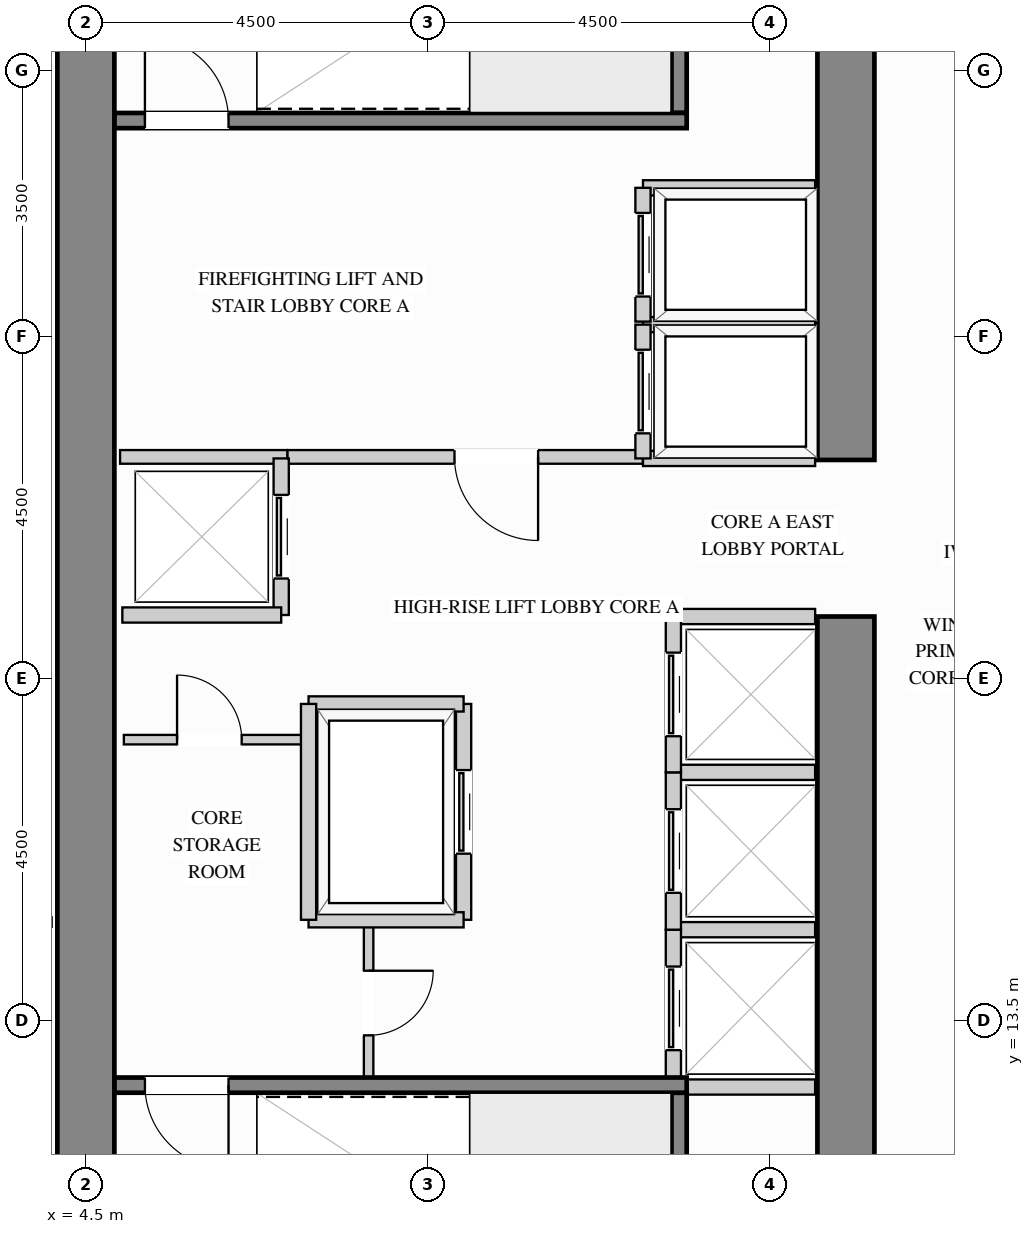
"""IFC4 building model, lengths in metres.
Left out: names, types, materials, properties, quantities, classifications, styles, units other than length and angle.
Written with IfcOpenShell. Run it as: python <this file> out.ifc"""

import sys

from ifc_helpers import new_model, si_unit, direction, frame, frame_2d, origin, place, context, subcontext, project, spatial, rectangle, extrude, source, transform, mapped, element, fill, save


model = new_model("IFC4")
c1 = context("Model", 3, precision=1e-05, world=origin(), true_north=direction((0.0, 1.0)))
c2 = subcontext(c1, "Body", "Model", "MODEL_VIEW")
j1 = project(units=[si_unit("LENGTHUNIT", "METRE"), si_unit("PLANEANGLEUNIT", "RADIAN")], contexts=[c1])
p1 = place(None, origin())
s1 = spatial("IfcSite", under=j1, at=p1, CompositionType="ELEMENT")
p2 = place(p1, origin())
s2 = spatial("IfcBuilding", under=s1, at=p2, CompositionType="ELEMENT")
p3 = place(p2, frame((0.0, 0.0, 95.4)))
s3 = spatial("IfcBuildingStorey", under=s2, at=p3, CompositionType="ELEMENT", Elevation=95.4)
m1 = source(origin(), c2, "Body", "SweptSolid", [
    extrude(rectangle(XDim=9.945, YDim=0.75, at=frame_2d((4.973, 0.0))), origin(), (0.0, 0.0, 1.0), 3.38),
])
p4 = place(p3, frame((14.5, 8.875, 0.0), z_axis=(0.0, 0.0, 1.0), x_axis=(0.0, 1.0, 0.0)))
e1 = element("IfcWall", 1, at=p4, inside=s3, PredefinedType="SHEAR", context=c2, shape_type="MappedRepresentation", body=[
    mapped(m1, transform((0.0, 0.0, 0.0), x_axis=(1.0, 0.0, 0.0), y_axis=(0.0, 1.0, 0.0), z_axis=(0.0, 0.0, 1.0))),
])
m2 = source(origin(), c2, "Body", "SweptSolid", [
    extrude(rectangle(XDim=8.245, YDim=0.75, at=frame_2d((4.123, 0.0))), origin(), (0.0, 0.0, 1.0), 3.38),
])
p5 = place(p3, frame((14.5, 20.88, 0.0), z_axis=(0.0, 0.0, 1.0), x_axis=(0.0, 1.0, 0.0)))
e2 = element("IfcWall", 2, at=p5, inside=s3, PredefinedType="SHEAR", context=c2, shape_type="MappedRepresentation", body=[
    mapped(m2, transform((0.0, 0.0, 0.0), x_axis=(1.0, 0.0, 0.0), y_axis=(0.0, 1.0, 0.0), z_axis=(0.0, 0.0, 1.0))),
])
m3 = source(origin(), c2, "Body", "SweptSolid", [
    extrude(rectangle(XDim=20.25, YDim=0.75, at=frame_2d((10.125, 0.0))), origin(), (0.0, 0.0, 1.0), 3.38),
])
p6 = place(p3, frame((4.5, 8.875, 0.0), z_axis=(0.0, 0.0, 1.0), x_axis=(0.0, 1.0, 0.0)))
e3 = element("IfcWall", 3, at=p6, inside=s3, PredefinedType="SHEAR", context=c2, shape_type="MappedRepresentation", body=[
    mapped(m3, transform((0.0, 0.0, 0.0), x_axis=(1.0, 0.0, 0.0), y_axis=(0.0, 1.0, 0.0), z_axis=(0.0, 0.0, 1.0))),
])
p7 = place(p3, frame((7.15, 20.92, 0.0), z_axis=(0.0, 0.0, 1.0), x_axis=(1.0, 0.0, 0.0)))
e4 = element("IfcWall", 4, at=p7, inside=s3, PredefinedType="PARTITIONING", context=c2, shape_type="SweptSolid", body=[
    extrude(rectangle(XDim=4.68, YDim=0.18, at=frame_2d((2.34, 0.0))), origin(), (0.0, 0.0, 1.0), 3.365),
])
p8 = place(p7, frame((2.2, 0.0, 0.0)))
e5 = element("IfcOpeningElement", 5, at=p8, cuts=e4, PredefinedType="OPENING", context=c2, shape_type="SweptSolid", body=[
    extrude(rectangle(XDim=1.1, YDim=2.15, at=frame_2d((0.55, 1.075))), frame((0.0, 0.1, 0.0), z_axis=(0.0, -1.0, 0.0), x_axis=(1.0, 0.0, 0.0)), (0.0, 0.0, 1.0), 0.2),
])
m4 = source(origin(), c2, "Body", "SweptSolid", [
    extrude(rectangle(XDim=2.2, YDim=0.18, at=frame_2d((1.1, 0.0))), origin(), (0.0, 0.0, 1.0), 3.365),
])
p9 = place(p3, frame((4.95, 20.92, 0.0), z_axis=(0.0, 0.0, 1.0), x_axis=(1.0, 0.0, 0.0)))
e6 = element("IfcWall", 6, at=p9, inside=s3, PredefinedType="PARTITIONING", context=c2, shape_type="MappedRepresentation", body=[
    mapped(m4, transform((0.0, 0.0, 0.0), x_axis=(1.0, 0.0, 0.0), y_axis=(0.0, 1.0, 0.0), z_axis=(0.0, 0.0, 1.0))),
])
p10 = place(p3, frame((8.22, 12.75, 0.0), z_axis=(0.0, 0.0, 1.0), x_axis=(0.0, 1.0, 0.0)))
e7 = element("IfcWall", 7, at=p10, inside=s3, PredefinedType="PARTITIONING", context=c2, shape_type="SweptSolid", body=[
    extrude(rectangle(XDim=2.07, YDim=0.125, at=frame_2d((1.035, 0.0))), origin(), (0.0, 0.0, 1.0), 3.365),
])
p11 = place(p10, frame((0.56, 0.0, 0.0)))
e8 = element("IfcOpeningElement", 8, at=p11, cuts=e7, PredefinedType="OPENING", context=c2, shape_type="SweptSolid", body=[
    extrude(rectangle(XDim=0.85, YDim=2.1, at=frame_2d((0.425, 1.05))), frame((0.0, 0.073, 0.0), z_axis=(0.0, -1.0, 0.0), x_axis=(1.0, 0.0, 0.0)), (0.0, 0.0, 1.0), 0.145),
])
p12 = place(p3, frame((5.0, 17.2, 0.0), z_axis=(0.0, 0.0, 1.0), x_axis=(1.0, 0.0, 0.0)))
e9 = element("IfcWall", 9, at=p12, inside=s3, PredefinedType="PARTITIONING", context=c2, shape_type="SweptSolid", body=[
    extrude(rectangle(XDim=2.4, YDim=0.125, at=frame_2d((1.2, 0.0))), origin(), (0.0, 0.0, 1.0), 3.365),
])
p13 = place(p12, frame((0.7, 0.0, 0.0)))
e10 = element("IfcOpeningElement", 10, at=p13, cuts=e9, PredefinedType="OPENING", context=c2, shape_type="SweptSolid", body=[
    extrude(rectangle(XDim=0.85, YDim=2.1, at=frame_2d((0.425, 1.05))), frame((0.0, 0.073, 0.0), z_axis=(0.0, -1.0, 0.0), x_axis=(1.0, 0.0, 0.0)), (0.0, 0.0, 1.0), 0.145),
])
m5 = source(origin(), c2, "Body", "SweptSolid", [
    extrude(rectangle(XDim=3.698, YDim=0.125, at=frame_2d((1.849, 0.0))), origin(), (0.0, 0.0, 1.0), 3.365),
])
p14 = place(p3, frame((0.352, 14.8, 0.0), z_axis=(0.0, 0.0, 1.0), x_axis=(1.0, 0.0, 0.0)))
e11 = element("IfcWall", 11, at=p14, inside=s3, PredefinedType="PARTITIONING", context=c2, shape_type="MappedRepresentation", body=[
    mapped(m5, transform((0.0, 0.0, 0.0), x_axis=(1.0, 0.0, 0.0), y_axis=(0.0, 1.0, 0.0), z_axis=(0.0, 0.0, 1.0))),
])
m6 = source(origin(), c2, "Body", "SweptSolid", [
    extrude(rectangle(XDim=2.265, YDim=0.2, at=frame_2d((1.132, 0.0))), origin(), (0.0, 0.0, 1.0), 3.365),
])
for number, where, z_axis, x_axis in (
    (12, (11.83, 22.66, 0.0), (0.0, 0.0, 1.0), (1.0, 0.0, 0.0)),
    (13, (11.83, 20.9, 0.0), (0.0, 0.0, 1.0), (1.0, 0.0, 0.0)),
):
    element("IfcWall", number, at=place(p3, frame(where, z_axis=z_axis, x_axis=x_axis)), inside=s3, PredefinedType="PARTITIONING", context=c2, shape_type="MappedRepresentation", body=[
        mapped(m6, transform((0.0, 0.0, 0.0), x_axis=(1.0, 0.0, 0.0), y_axis=(0.0, 1.0, 0.0), z_axis=(0.0, 0.0, 1.0))),
    ])
p15 = place(p3, frame((11.83, 20.9, 0.0), z_axis=(0.0, 0.0, 1.0), x_axis=(0.0, 1.0, 0.0)))
e14 = element("IfcWall", 14, at=p15, inside=s3, PredefinedType="PARTITIONING", context=c2, shape_type="SweptSolid", body=[
    extrude(rectangle(XDim=1.76, YDim=0.2, at=frame_2d((0.88, 0.0))), origin(), (0.0, 0.0, 1.0), 3.365),
])
p16 = place(p15, frame((0.33, 0.0, 0.0)))
e15 = element("IfcOpeningElement", 15, at=p16, cuts=e14, PredefinedType="OPENING", context=c2, shape_type="SweptSolid", body=[
    extrude(rectangle(XDim=1.1, YDim=2.2, at=frame_2d((0.55, 1.1))), frame((0.0, 0.11, 0.0), z_axis=(0.0, -1.0, 0.0), x_axis=(1.0, 0.0, 0.0)), (0.0, 0.0, 1.0), 0.22),
])
p17 = place(p3, frame((11.83, 24.46, 0.0), z_axis=(0.0, 0.0, 1.0), x_axis=(1.0, 0.0, 0.0)))
e16 = element("IfcWall", 16, at=p17, inside=s3, PredefinedType="PARTITIONING", context=c2, shape_type="MappedRepresentation", body=[
    mapped(m6, transform((0.0, 0.0, 0.0), x_axis=(1.0, 0.0, 0.0), y_axis=(0.0, 1.0, 0.0), z_axis=(0.0, 0.0, 1.0))),
])
p18 = place(p3, frame((11.83, 22.7, 0.0), z_axis=(0.0, 0.0, 1.0), x_axis=(0.0, 1.0, 0.0)))
e17 = element("IfcWall", 17, at=p18, inside=s3, PredefinedType="PARTITIONING", context=c2, shape_type="SweptSolid", body=[
    extrude(rectangle(XDim=1.76, YDim=0.2, at=frame_2d((0.88, 0.0))), origin(), (0.0, 0.0, 1.0), 3.365),
])
p19 = place(p18, frame((0.33, 0.0, 0.0)))
e18 = element("IfcOpeningElement", 18, at=p19, cuts=e17, PredefinedType="OPENING", context=c2, shape_type="SweptSolid", body=[
    extrude(rectangle(XDim=1.1, YDim=2.2, at=frame_2d((0.55, 1.1))), frame((0.0, 0.11, 0.0), z_axis=(0.0, -1.0, 0.0), x_axis=(1.0, 0.0, 0.0)), (0.0, 0.0, 1.0), 0.22),
])
m7 = source(origin(), c2, "Body", "SweptSolid", [
    extrude(rectangle(XDim=1.865, YDim=0.2, at=frame_2d((0.933, 0.0))), origin(), (0.0, 0.0, 1.0), 3.365),
])
for number, where, z_axis, x_axis in (
    (19, (12.23, 14.7, 0.0), (0.0, 0.0, 1.0), (1.0, 0.0, 0.0)),
    (20, (12.23, 12.63, 0.0), (0.0, 0.0, 1.0), (1.0, 0.0, 0.0)),
):
    element("IfcWall", number, at=place(p3, frame(where, z_axis=z_axis, x_axis=x_axis)), inside=s3, PredefinedType="PARTITIONING", context=c2, shape_type="MappedRepresentation", body=[
        mapped(m7, transform((0.0, 0.0, 0.0), x_axis=(1.0, 0.0, 0.0), y_axis=(0.0, 1.0, 0.0), z_axis=(0.0, 0.0, 1.0))),
    ])
p20 = place(p3, frame((12.23, 12.63, 0.0), z_axis=(0.0, 0.0, 1.0), x_axis=(0.0, 1.0, 0.0)))
e21 = element("IfcWall", 21, at=p20, inside=s3, PredefinedType="PARTITIONING", context=c2, shape_type="SweptSolid", body=[
    extrude(rectangle(XDim=2.07, YDim=0.2, at=frame_2d((1.035, 0.0))), origin(), (0.0, 0.0, 1.0), 3.365),
])
p21 = place(p20, frame((0.485, 0.0, 0.0)))
e22 = element("IfcOpeningElement", 22, at=p21, cuts=e21, PredefinedType="OPENING", context=c2, shape_type="SweptSolid", body=[
    extrude(rectangle(XDim=1.1, YDim=2.2, at=frame_2d((0.55, 1.1))), frame((0.0, 0.11, 0.0), z_axis=(0.0, -1.0, 0.0), x_axis=(1.0, 0.0, 0.0)), (0.0, 0.0, 1.0), 0.22),
])
p22 = place(p3, frame((12.23, 16.77, 0.0), z_axis=(0.0, 0.0, 1.0), x_axis=(1.0, 0.0, 0.0)))
e23 = element("IfcWall", 23, at=p22, inside=s3, PredefinedType="PARTITIONING", context=c2, shape_type="MappedRepresentation", body=[
    mapped(m7, transform((0.0, 0.0, 0.0), x_axis=(1.0, 0.0, 0.0), y_axis=(0.0, 1.0, 0.0), z_axis=(0.0, 0.0, 1.0))),
])
p23 = place(p3, frame((12.23, 14.7, 0.0), z_axis=(0.0, 0.0, 1.0), x_axis=(0.0, 1.0, 0.0)))
e24 = element("IfcWall", 24, at=p23, inside=s3, PredefinedType="PARTITIONING", context=c2, shape_type="SweptSolid", body=[
    extrude(rectangle(XDim=2.07, YDim=0.2, at=frame_2d((1.035, 0.0))), origin(), (0.0, 0.0, 1.0), 3.365),
])
p24 = place(p23, frame((0.485, 0.0, 0.0)))
e25 = element("IfcOpeningElement", 25, at=p24, cuts=e24, PredefinedType="OPENING", context=c2, shape_type="SweptSolid", body=[
    extrude(rectangle(XDim=1.1, YDim=2.2, at=frame_2d((0.55, 1.1))), frame((0.0, 0.11, 0.0), z_axis=(0.0, -1.0, 0.0), x_axis=(1.0, 0.0, 0.0)), (0.0, 0.0, 1.0), 0.22),
])
p25 = place(p3, frame((12.23, 18.82, 0.0), z_axis=(0.0, 0.0, 1.0), x_axis=(1.0, 0.0, 0.0)))
e26 = element("IfcWall", 26, at=p25, inside=s3, PredefinedType="PARTITIONING", context=c2, shape_type="MappedRepresentation", body=[
    mapped(m7, transform((0.0, 0.0, 0.0), x_axis=(1.0, 0.0, 0.0), y_axis=(0.0, 1.0, 0.0), z_axis=(0.0, 0.0, 1.0))),
])
p26 = place(p3, frame((12.23, 16.77, 0.0), z_axis=(0.0, 0.0, 1.0), x_axis=(0.0, 1.0, 0.0)))
e27 = element("IfcWall", 27, at=p26, inside=s3, PredefinedType="PARTITIONING", context=c2, shape_type="SweptSolid", body=[
    extrude(rectangle(XDim=2.05, YDim=0.2, at=frame_2d((1.025, 0.0))), origin(), (0.0, 0.0, 1.0), 3.365),
])
p27 = place(p26, frame((0.475, 0.0, 0.0)))
e28 = element("IfcOpeningElement", 28, at=p27, cuts=e27, PredefinedType="OPENING", context=c2, shape_type="SweptSolid", body=[
    extrude(rectangle(XDim=1.1, YDim=2.2, at=frame_2d((0.55, 1.1))), frame((0.0, 0.11, 0.0), z_axis=(0.0, -1.0, 0.0), x_axis=(1.0, 0.0, 0.0)), (0.0, 0.0, 1.0), 0.22),
])
p28 = place(p3, frame((7.07, 18.84, 0.0), z_axis=(0.0, 0.0, 1.0), x_axis=(0.0, 1.0, 0.0)))
e29 = element("IfcWall", 29, at=p28, inside=s3, PredefinedType="PARTITIONING", context=c2, shape_type="SweptSolid", body=[
    extrude(rectangle(XDim=2.06, YDim=0.2, at=frame_2d((1.03, 0.0))), origin(), (0.0, 0.0, 1.0), 3.365),
])
p29 = place(p28, frame((0.48, 0.0, 0.0)))
e30 = element("IfcOpeningElement", 30, at=p29, cuts=e29, PredefinedType="OPENING", context=c2, shape_type="SweptSolid", body=[
    extrude(rectangle(XDim=1.1, YDim=2.2, at=frame_2d((0.55, 1.1))), frame((0.0, 0.11, 0.0), z_axis=(0.0, -1.0, 0.0), x_axis=(1.0, 0.0, 0.0)), (0.0, 0.0, 1.0), 0.22),
])
m8 = source(origin(), c2, "Body", "SweptSolid", [
    extrude(rectangle(XDim=2.09, YDim=0.2, at=frame_2d((1.045, 0.0))), origin(), (0.0, 0.0, 1.0), 3.365),
])
p30 = place(p3, frame((4.98, 18.84, 0.0), z_axis=(0.0, 0.0, 1.0), x_axis=(1.0, 0.0, 0.0)))
e31 = element("IfcWall", 31, at=p30, inside=s3, PredefinedType="PARTITIONING", context=c2, shape_type="MappedRepresentation", body=[
    mapped(m8, transform((0.0, 0.0, 0.0), x_axis=(1.0, 0.0, 0.0), y_axis=(0.0, 1.0, 0.0), z_axis=(0.0, 0.0, 1.0))),
])
p31 = place(p3, frame((9.47, 14.83, 0.0), z_axis=(0.0, 0.0, 1.0), x_axis=(0.0, 1.0, 0.0)))
e32 = element("IfcWall", 32, at=p31, inside=s3, PredefinedType="PARTITIONING", context=c2, shape_type="SweptSolid", body=[
    extrude(rectangle(XDim=2.84, YDim=0.2, at=frame_2d((1.42, 0.0))), origin(), (0.0, 0.0, 1.0), 3.365),
])
p32 = place(p31, frame((0.87, 0.0, 0.0)))
e33 = element("IfcOpeningElement", 33, at=p32, cuts=e32, PredefinedType="OPENING", context=c2, shape_type="SweptSolid", body=[
    extrude(rectangle(XDim=1.1, YDim=2.2, at=frame_2d((0.55, 1.1))), frame((0.0, 0.11, 0.0), z_axis=(0.0, -1.0, 0.0), x_axis=(1.0, 0.0, 0.0)), (0.0, 0.0, 1.0), 0.22),
])
m9 = source(origin(), c2, "Body", "SweptSolid", [
    extrude(rectangle(XDim=2.04, YDim=0.2, at=frame_2d((1.02, 0.0))), origin(), (0.0, 0.0, 1.0), 3.365),
])
for number, where, z_axis, x_axis in (
    (34, (7.43, 17.67, 0.0), (0.0, 0.0, 1.0), (1.0, 0.0, 0.0)),
    (35, (7.43, 14.83, 0.0), (0.0, 0.0, 1.0), (1.0, 0.0, 0.0)),
):
    element("IfcWall", number, at=place(p3, frame(where, z_axis=z_axis, x_axis=x_axis)), inside=s3, PredefinedType="PARTITIONING", context=c2, shape_type="MappedRepresentation", body=[
        mapped(m9, transform((0.0, 0.0, 0.0), x_axis=(1.0, 0.0, 0.0), y_axis=(0.0, 1.0, 0.0), z_axis=(0.0, 0.0, 1.0))),
    ])
m10 = source(origin(), c2, "Body", "SweptSolid", [
    extrude(rectangle(XDim=2.84, YDim=0.2, at=frame_2d((1.42, 0.0))), origin(), (0.0, 0.0, 1.0), 3.365),
])
p33 = place(p3, frame((7.43, 14.83, 0.0), z_axis=(0.0, 0.0, 1.0), x_axis=(0.0, 1.0, 0.0)))
e36 = element("IfcWall", 36, at=p33, inside=s3, PredefinedType="PARTITIONING", context=c2, shape_type="MappedRepresentation", body=[
    mapped(m10, transform((0.0, 0.0, 0.0), x_axis=(1.0, 0.0, 0.0), y_axis=(0.0, 1.0, 0.0), z_axis=(0.0, 0.0, 1.0))),
])
m11 = source(origin(), c2, "Body", "SweptSolid", [
    extrude(rectangle(XDim=3.678, YDim=0.2, at=frame_2d((1.839, 0.0))), origin(), (0.0, 0.0, 1.0), 3.38),
])
p34 = place(p3, frame((12.305, 8.877, 0.0), z_axis=(0.0, 0.0, 1.0), x_axis=(0.0, 1.0, 0.0)))
e37 = element("IfcWall", 37, at=p34, inside=s3, PredefinedType="SHEAR", context=c2, shape_type="MappedRepresentation", body=[
    mapped(m11, transform((0.0, 0.0, 0.0), x_axis=(1.0, 0.0, 0.0), y_axis=(0.0, 1.0, 0.0), z_axis=(0.0, 0.0, 1.0))),
])
p35 = place(p3, frame((4.877, 12.655, 0.0), z_axis=(0.0, 0.0, 1.0), x_axis=(1.0, 0.0, 0.0)))
e38 = element("IfcWall", 38, at=p35, inside=s3, PredefinedType="SHEAR", context=c2, shape_type="SweptSolid", body=[
    extrude(rectangle(XDim=7.528, YDim=0.2, at=frame_2d((3.764, 0.0))), origin(), (0.0, 0.0, 1.0), 3.38),
])
p36 = place(p35, frame((0.4, 0.0, 0.0)))
e39 = element("IfcOpeningElement", 39, at=p36, cuts=e38, PredefinedType="OPENING", context=c2, shape_type="SweptSolid", body=[
    extrude(rectangle(XDim=1.1, YDim=2.15, at=frame_2d((0.55, 1.075))), frame((0.0, 0.11, 0.0), z_axis=(0.0, -1.0, 0.0), x_axis=(1.0, 0.0, 0.0)), (0.0, 0.0, 1.0), 0.22),
])
p37 = place(p3, frame((12.305, 25.445, 0.0), z_axis=(0.0, 0.0, 1.0), x_axis=(0.0, 1.0, 0.0)))
e40 = element("IfcWall", 40, at=p37, inside=s3, PredefinedType="SHEAR", context=c2, shape_type="MappedRepresentation", body=[
    mapped(m11, transform((0.0, 0.0, 0.0), x_axis=(1.0, 0.0, 0.0), y_axis=(0.0, 1.0, 0.0), z_axis=(0.0, 0.0, 1.0))),
])
p38 = place(p3, frame((4.877, 25.345, 0.0), z_axis=(0.0, 0.0, 1.0), x_axis=(1.0, 0.0, 0.0)))
e41 = element("IfcWall", 41, at=p38, inside=s3, PredefinedType="SHEAR", context=c2, shape_type="SweptSolid", body=[
    extrude(rectangle(XDim=7.528, YDim=0.2, at=frame_2d((3.764, 0.0))), origin(), (0.0, 0.0, 1.0), 3.38),
])
p39 = place(p38, frame((0.4, 0.0, 0.0)))
e42 = element("IfcOpeningElement", 42, at=p39, cuts=e41, PredefinedType="OPENING", context=c2, shape_type="SweptSolid", body=[
    extrude(rectangle(XDim=1.1, YDim=2.15, at=frame_2d((0.55, 1.075))), frame((0.0, 0.11, 0.0), z_axis=(0.0, -1.0, 0.0), x_axis=(1.0, 0.0, 0.0)), (0.0, 0.0, 1.0), 0.22),
])
m12 = source(origin(), c2, "Body", "SweptSolid", [
    extrude(rectangle(XDim=1.1, YDim=2.15, at=frame_2d((0.55, 1.075))), frame((0.0, 0.025, 0.0), z_axis=(0.0, -1.0, 0.0), x_axis=(1.0, 0.0, 0.0)), (0.0, 0.0, 1.0), 0.05),
])
p40 = place(p8, origin())
e43 = element("IfcDoor", 43, at=p40, inside=s3, OperationType="SINGLE_SWING_RIGHT", PredefinedType="DOOR", context=c2, shape_type="MappedRepresentation", body=[
    mapped(m12, transform((0.0, 0.0, 0.0), x_axis=(1.0, 0.0, 0.0), y_axis=(0.0, 1.0, 0.0), z_axis=(0.0, 0.0, 1.0))),
])
fill(e5, e43)
m13 = source(origin(), c2, "Body", "SweptSolid", [
    extrude(rectangle(XDim=1.1, YDim=2.2, at=frame_2d((0.55, 1.1))), frame((0.0, 0.025, 0.0), z_axis=(0.0, -1.0, 0.0), x_axis=(1.0, 0.0, 0.0)), (0.0, 0.0, 1.0), 0.05),
])
p41 = place(p16, origin())
e44 = element("IfcDoor", 44, at=p41, inside=s3, OperationType="SLIDING_TO_LEFT", PredefinedType="DOOR", context=c2, shape_type="MappedRepresentation", body=[
    mapped(m13, transform((0.0, 0.0, 0.0), x_axis=(1.0, 0.0, 0.0), y_axis=(0.0, 1.0, 0.0), z_axis=(0.0, 0.0, 1.0))),
])
fill(e15, e44)
p42 = place(p19, origin())
e45 = element("IfcDoor", 45, at=p42, inside=s3, OperationType="SLIDING_TO_LEFT", PredefinedType="DOOR", context=c2, shape_type="MappedRepresentation", body=[
    mapped(m13, transform((0.0, 0.0, 0.0), x_axis=(1.0, 0.0, 0.0), y_axis=(0.0, 1.0, 0.0), z_axis=(0.0, 0.0, 1.0))),
])
fill(e18, e45)
p43 = place(p21, origin())
e46 = element("IfcDoor", 46, at=p43, inside=s3, OperationType="SLIDING_TO_LEFT", PredefinedType="DOOR", context=c2, shape_type="MappedRepresentation", body=[
    mapped(m13, transform((0.0, 0.0, 0.0), x_axis=(1.0, 0.0, 0.0), y_axis=(0.0, 1.0, 0.0), z_axis=(0.0, 0.0, 1.0))),
])
fill(e22, e46)
p44 = place(p24, origin())
e47 = element("IfcDoor", 47, at=p44, inside=s3, OperationType="SLIDING_TO_LEFT", PredefinedType="DOOR", context=c2, shape_type="MappedRepresentation", body=[
    mapped(m13, transform((0.0, 0.0, 0.0), x_axis=(1.0, 0.0, 0.0), y_axis=(0.0, 1.0, 0.0), z_axis=(0.0, 0.0, 1.0))),
])
fill(e25, e47)
p45 = place(p27, origin())
e48 = element("IfcDoor", 48, at=p45, inside=s3, OperationType="SLIDING_TO_LEFT", PredefinedType="DOOR", context=c2, shape_type="MappedRepresentation", body=[
    mapped(m13, transform((0.0, 0.0, 0.0), x_axis=(1.0, 0.0, 0.0), y_axis=(0.0, 1.0, 0.0), z_axis=(0.0, 0.0, 1.0))),
])
fill(e28, e48)
p46 = place(p29, origin())
e49 = element("IfcDoor", 49, at=p46, inside=s3, OperationType="SLIDING_TO_LEFT", PredefinedType="DOOR", context=c2, shape_type="MappedRepresentation", body=[
    mapped(m13, transform((0.0, 0.0, 0.0), x_axis=(1.0, 0.0, 0.0), y_axis=(0.0, 1.0, 0.0), z_axis=(0.0, 0.0, 1.0))),
])
fill(e30, e49)
p47 = place(p32, origin())
e50 = element("IfcDoor", 50, at=p47, inside=s3, OperationType="SLIDING_TO_LEFT", PredefinedType="DOOR", context=c2, shape_type="MappedRepresentation", body=[
    mapped(m13, transform((0.0, 0.0, 0.0), x_axis=(1.0, 0.0, 0.0), y_axis=(0.0, 1.0, 0.0), z_axis=(0.0, 0.0, 1.0))),
])
fill(e33, e50)
m14 = source(origin(), c2, "Body", "SweptSolid", [
    extrude(rectangle(XDim=0.85, YDim=2.1, at=frame_2d((0.425, 1.05))), frame((0.0, 0.025, 0.0), z_axis=(0.0, -1.0, 0.0), x_axis=(1.0, 0.0, 0.0)), (0.0, 0.0, 1.0), 0.05),
])
p48 = place(p13, origin())
e51 = element("IfcDoor", 51, at=p48, inside=s3, OperationType="SINGLE_SWING_LEFT", PredefinedType="DOOR", context=c2, shape_type="MappedRepresentation", body=[
    mapped(m14, transform((0.0, 0.0, 0.0), x_axis=(1.0, 0.0, 0.0), y_axis=(0.0, 1.0, 0.0), z_axis=(0.0, 0.0, 1.0))),
])
fill(e10, e51)
p49 = place(p11, origin())
e52 = element("IfcDoor", 52, at=p49, inside=s3, OperationType="SINGLE_SWING_RIGHT", PredefinedType="DOOR", context=c2, shape_type="MappedRepresentation", body=[
    mapped(m14, transform((0.0, 0.0, 0.0), x_axis=(1.0, 0.0, 0.0), y_axis=(0.0, 1.0, 0.0), z_axis=(0.0, 0.0, 1.0))),
])
fill(e8, e52)
m15 = source(origin(), c2, "Body", "SweptSolid", [
    extrude(rectangle(XDim=1.1, YDim=2.15, at=frame_2d((0.55, 1.075))), frame((0.0, 0.025, 0.0), z_axis=(0.0, -1.0, 0.0), x_axis=(1.0, 0.0, 0.0)), (0.0, 0.0, 1.0), 0.05),
])
p50 = place(p36, origin())
e53 = element("IfcDoor", 53, at=p50, inside=s3, OperationType="SINGLE_SWING_RIGHT", PredefinedType="DOOR", context=c2, shape_type="MappedRepresentation", body=[
    mapped(m15, transform((0.0, 0.0, 0.0), x_axis=(1.0, 0.0, 0.0), y_axis=(0.0, 1.0, 0.0), z_axis=(0.0, 0.0, 1.0))),
])
fill(e39, e53)
p51 = place(p39, origin())
e54 = element("IfcDoor", 54, at=p51, inside=s3, OperationType="SINGLE_SWING_LEFT", PredefinedType="DOOR", context=c2, shape_type="MappedRepresentation", body=[
    mapped(m15, transform((0.0, 0.0, 0.0), x_axis=(1.0, 0.0, 0.0), y_axis=(0.0, 1.0, 0.0), z_axis=(0.0, 0.0, 1.0))),
])
fill(e42, e54)
save(model, sys.argv[1])
